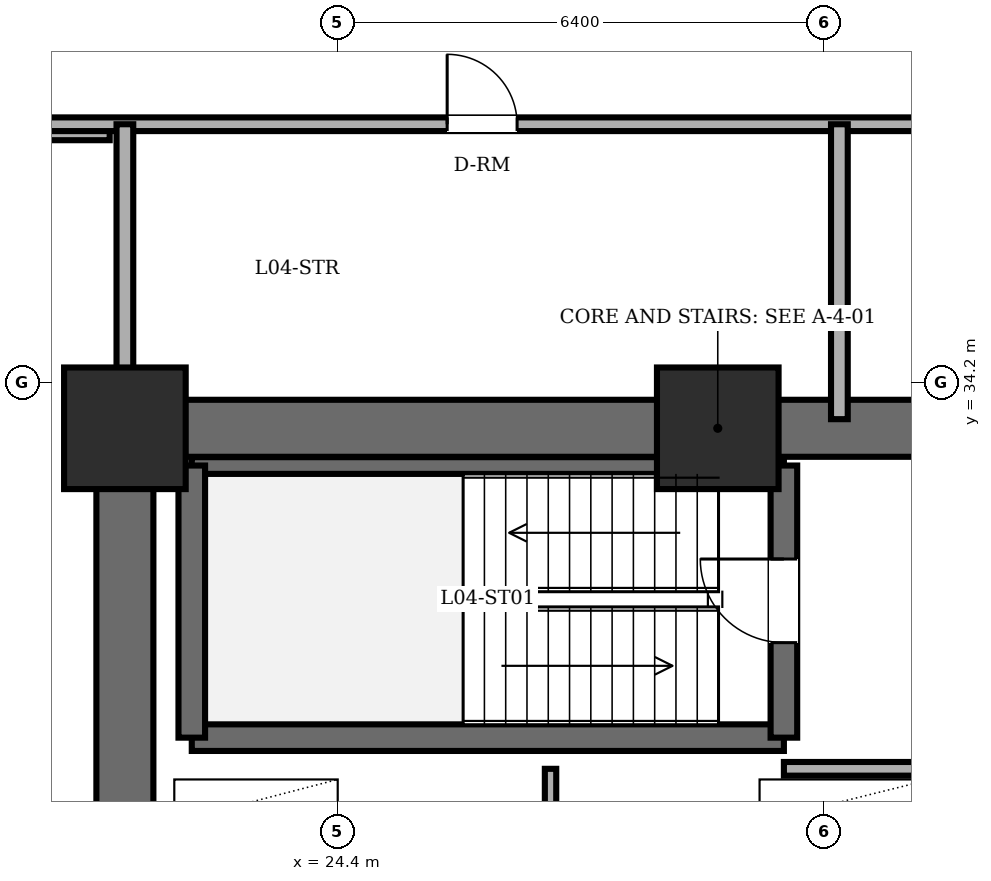
"""IFC4 building model, lengths in metres.
Left out: names, types, materials, properties, quantities, classifications, styles, units other than length and angle.
Written with IfcOpenShell. Run it as: python <this file> out.ifc"""

import sys

from ifc_helpers import new_model, si_unit, direction, frame, frame_2d, origin, origin_2d, place, context, subcontext, project, spatial, rectangle, extrude, element, fill, save


model = new_model("IFC4")
c1 = context("Model", 3, precision=1e-05, world=origin(), true_north=direction((0.0, 1.0)))
c2 = subcontext(c1, "Body", "Model", "MODEL_VIEW")
j1 = project(units=[si_unit("LENGTHUNIT", "METRE"), si_unit("PLANEANGLEUNIT", "RADIAN")], contexts=[c1])
p1 = place(None, origin())
s1 = spatial("IfcSite", under=j1, at=p1, CompositionType="ELEMENT")
p2 = place(p1, origin())
s2 = spatial("IfcBuilding", under=s1, at=p2, CompositionType="ELEMENT")
p3 = place(p2, frame((0.0, 0.0, 14.7)))
s3 = spatial("IfcBuildingStorey", under=s2, at=p3, CompositionType="ELEMENT", Elevation=14.7)
for number, where, z_axis, x_axis in (
    (1, (29.4, 33.6, 0.0), (0.0, 0.0, 1.0), (1.0, 0.0, 0.0)),
    (2, (21.6, 33.6, 0.0), (0.0, 0.0, 1.0), (1.0, 0.0, 0.0)),
):
    element("IfcColumn", number, at=place(p3, frame(where, z_axis=z_axis, x_axis=x_axis)), inside=s3, PredefinedType="COLUMN", context=c2, shape_type="SweptSolid", body=[
        extrude(rectangle(XDim=1.6, YDim=1.6, at=origin_2d()), origin(), (0.0, 0.0, 1.0), 4.65),
    ])
p4 = place(p3, frame((21.6, 14.4, 0.0), z_axis=(0.0, 0.0, 1.0), x_axis=(0.0, 1.0, 0.0)))
e3 = element("IfcWall", 3, at=p4, inside=s3, PredefinedType="SHEAR", context=c2, shape_type="SweptSolid", body=[
    extrude(rectangle(XDim=19.2, YDim=0.75, at=frame_2d((9.6, 0.0))), origin(), (0.0, 0.0, 1.0), 4.45),
])
p5 = place(p3, frame((21.6, 33.6, 0.0), z_axis=(0.0, 0.0, 1.0), x_axis=(1.0, 0.0, 0.0)))
e4 = element("IfcWall", 4, at=p5, inside=s3, PredefinedType="SHEAR", context=c2, shape_type="SweptSolid", body=[
    extrude(rectangle(XDim=15.6, YDim=0.75, at=frame_2d((7.8, 0.0))), origin(), (0.0, 0.0, 1.0), 4.45),
])
p6 = place(p3, frame((22.48, 29.53, 0.0), z_axis=(0.0, 0.0, 1.0), x_axis=(1.0, 0.0, 0.0)))
e5 = element("IfcWall", 5, at=p6, inside=s3, PredefinedType="SOLIDWALL", context=c2, shape_type="SweptSolid", body=[
    extrude(rectangle(XDim=7.79, YDim=0.35, at=frame_2d((3.895, 0.0))), origin(), (0.0, 0.0, 1.0), 4.45),
])
p7 = place(p3, frame((22.48, 33.11, 0.0), z_axis=(0.0, 0.0, 1.0), x_axis=(1.0, 0.0, 0.0)))
e6 = element("IfcWall", 6, at=p7, inside=s3, PredefinedType="PARTITIONING", context=c2, shape_type="SweptSolid", body=[
    extrude(rectangle(XDim=7.79, YDim=0.22, at=frame_2d((3.895, 0.0))), origin(), (0.0, 0.0, 1.0), 4.45),
])
p8 = place(p3, frame((22.48, 29.53, 0.0), z_axis=(0.0, 0.0, 1.0), x_axis=(0.0, 1.0, 0.0)))
e7 = element("IfcWall", 7, at=p8, inside=s3, PredefinedType="SOLIDWALL", context=c2, shape_type="SweptSolid", body=[
    extrude(rectangle(XDim=3.58, YDim=0.35, at=frame_2d((1.79, 0.0))), origin(), (0.0, 0.0, 1.0), 4.45),
])
p9 = place(p3, frame((30.27, 29.53, 0.0), z_axis=(0.0, 0.0, 1.0), x_axis=(0.0, 1.0, 0.0)))
e8 = element("IfcWall", 8, at=p9, inside=s3, PredefinedType="SOLIDWALL", context=c2, shape_type="SweptSolid", body=[
    extrude(rectangle(XDim=3.58, YDim=0.35, at=frame_2d((1.79, 0.0))), origin(), (0.0, 0.0, 1.0), 4.45),
])
p10 = place(p9, frame((1.25, 0.0, 0.0)))
e9 = element("IfcOpeningElement", 9, at=p10, cuts=e8, PredefinedType="OPENING", context=c2, shape_type="SweptSolid", body=[
    extrude(rectangle(XDim=1.1, YDim=2.15, at=frame_2d((0.55, 1.075))), frame((0.0, 0.185, 0.0), z_axis=(0.0, -1.0, 0.0), x_axis=(1.0, 0.0, 0.0)), (0.0, 0.0, 1.0), 0.37),
])
p11 = place(p3, frame((30.27, 29.12, 0.0), z_axis=(0.0, 0.0, 1.0), x_axis=(1.0, 0.0, 0.0)))
e10 = element("IfcWall", 10, at=p11, inside=s3, PredefinedType="PARTITIONING", context=c2, shape_type="SweptSolid", body=[
    extrude(rectangle(XDim=2.24, YDim=0.18, at=frame_2d((1.12, 0.0))), origin(), (0.0, 0.0, 1.0), 4.45),
])
p12 = place(p3, frame((27.2, 27.6, 0.0), z_axis=(0.0, 0.0, 1.0), x_axis=(0.0, 1.0, 0.0)))
e11 = element("IfcWall", 11, at=p12, inside=s3, PredefinedType="PARTITIONING", context=c2, shape_type="SweptSolid", body=[
    extrude(rectangle(XDim=1.52, YDim=0.15, at=frame_2d((0.76, 0.0))), origin(), (0.0, 0.0, 1.0), 4.45),
])
p13 = place(p3, frame((1.6, 37.5, 0.0), z_axis=(0.0, 0.0, 1.0), x_axis=(1.0, 0.0, 0.0)))
e12 = element("IfcWall", 12, at=p13, inside=s3, PredefinedType="PARTITIONING", context=c2, shape_type="SweptSolid", body=[
    extrude(rectangle(XDim=19.8, YDim=0.22, at=frame_2d((9.9, 0.0))), origin(), (0.0, 0.0, 1.0), 4.45),
])
p14 = place(p3, frame((17.85, 37.6, 0.0), z_axis=(0.0, 0.0, 1.0), x_axis=(1.0, 0.0, 0.0)))
e13 = element("IfcWall", 13, at=p14, inside=s3, PredefinedType="PARTITIONING", context=c2, shape_type="SweptSolid", body=[
    extrude(rectangle(XDim=19.45, YDim=0.18, at=frame_2d((9.725, 0.0))), origin(), (0.0, 0.0, 1.0), 4.45),
])
p15 = place(p14, frame((7.99, 0.0, 0.0)))
e14 = element("IfcOpeningElement", 14, at=p15, cuts=e13, PredefinedType="OPENING", context=c2, shape_type="SweptSolid", body=[
    extrude(rectangle(XDim=0.92, YDim=2.1, at=frame_2d((0.46, 1.05))), frame((0.0, 0.1, 0.0), z_axis=(0.0, -1.0, 0.0), x_axis=(1.0, 0.0, 0.0)), (0.0, 0.0, 1.0), 0.2),
])
p16 = place(p3, frame((21.6, 33.72, 0.0), z_axis=(0.0, 0.0, 1.0), x_axis=(0.0, 1.0, 0.0)))
e15 = element("IfcWall", 15, at=p16, inside=s3, PredefinedType="PARTITIONING", context=c2, shape_type="SweptSolid", body=[
    extrude(rectangle(XDim=3.88, YDim=0.22, at=frame_2d((1.94, 0.0))), origin(), (0.0, 0.0, 1.0), 3.632),
])
p17 = place(p3, frame((31.0, 33.72, 0.0), z_axis=(0.0, 0.0, 1.0), x_axis=(0.0, 1.0, 0.0)))
e16 = element("IfcWall", 16, at=p17, inside=s3, PredefinedType="PARTITIONING", context=c2, shape_type="SweptSolid", body=[
    extrude(rectangle(XDim=3.88, YDim=0.22, at=frame_2d((1.94, 0.0))), origin(), (0.0, 0.0, 1.0), 4.45),
])
p18 = place(p10, origin())
e17 = element("IfcDoor", 17, at=p18, inside=s3, OperationType="SINGLE_SWING_RIGHT", PredefinedType="DOOR", context=c2, shape_type="SweptSolid", body=[
    extrude(rectangle(XDim=1.1, YDim=2.15, at=frame_2d((0.55, 1.075))), frame((0.0, 0.025, 0.0), z_axis=(0.0, -1.0, 0.0), x_axis=(1.0, 0.0, 0.0)), (0.0, 0.0, 1.0), 0.05),
])
fill(e9, e17)
p19 = place(p15, origin())
e18 = element("IfcDoor", 18, at=p19, inside=s3, OperationType="SINGLE_SWING_LEFT", PredefinedType="DOOR", context=c2, shape_type="SweptSolid", body=[
    extrude(rectangle(XDim=0.92, YDim=2.1, at=frame_2d((0.46, 1.05))), frame((0.0, 0.025, 0.0), z_axis=(0.0, -1.0, 0.0), x_axis=(1.0, 0.0, 0.0)), (0.0, 0.0, 1.0), 0.05),
])
fill(e14, e18)
save(model, sys.argv[1])
